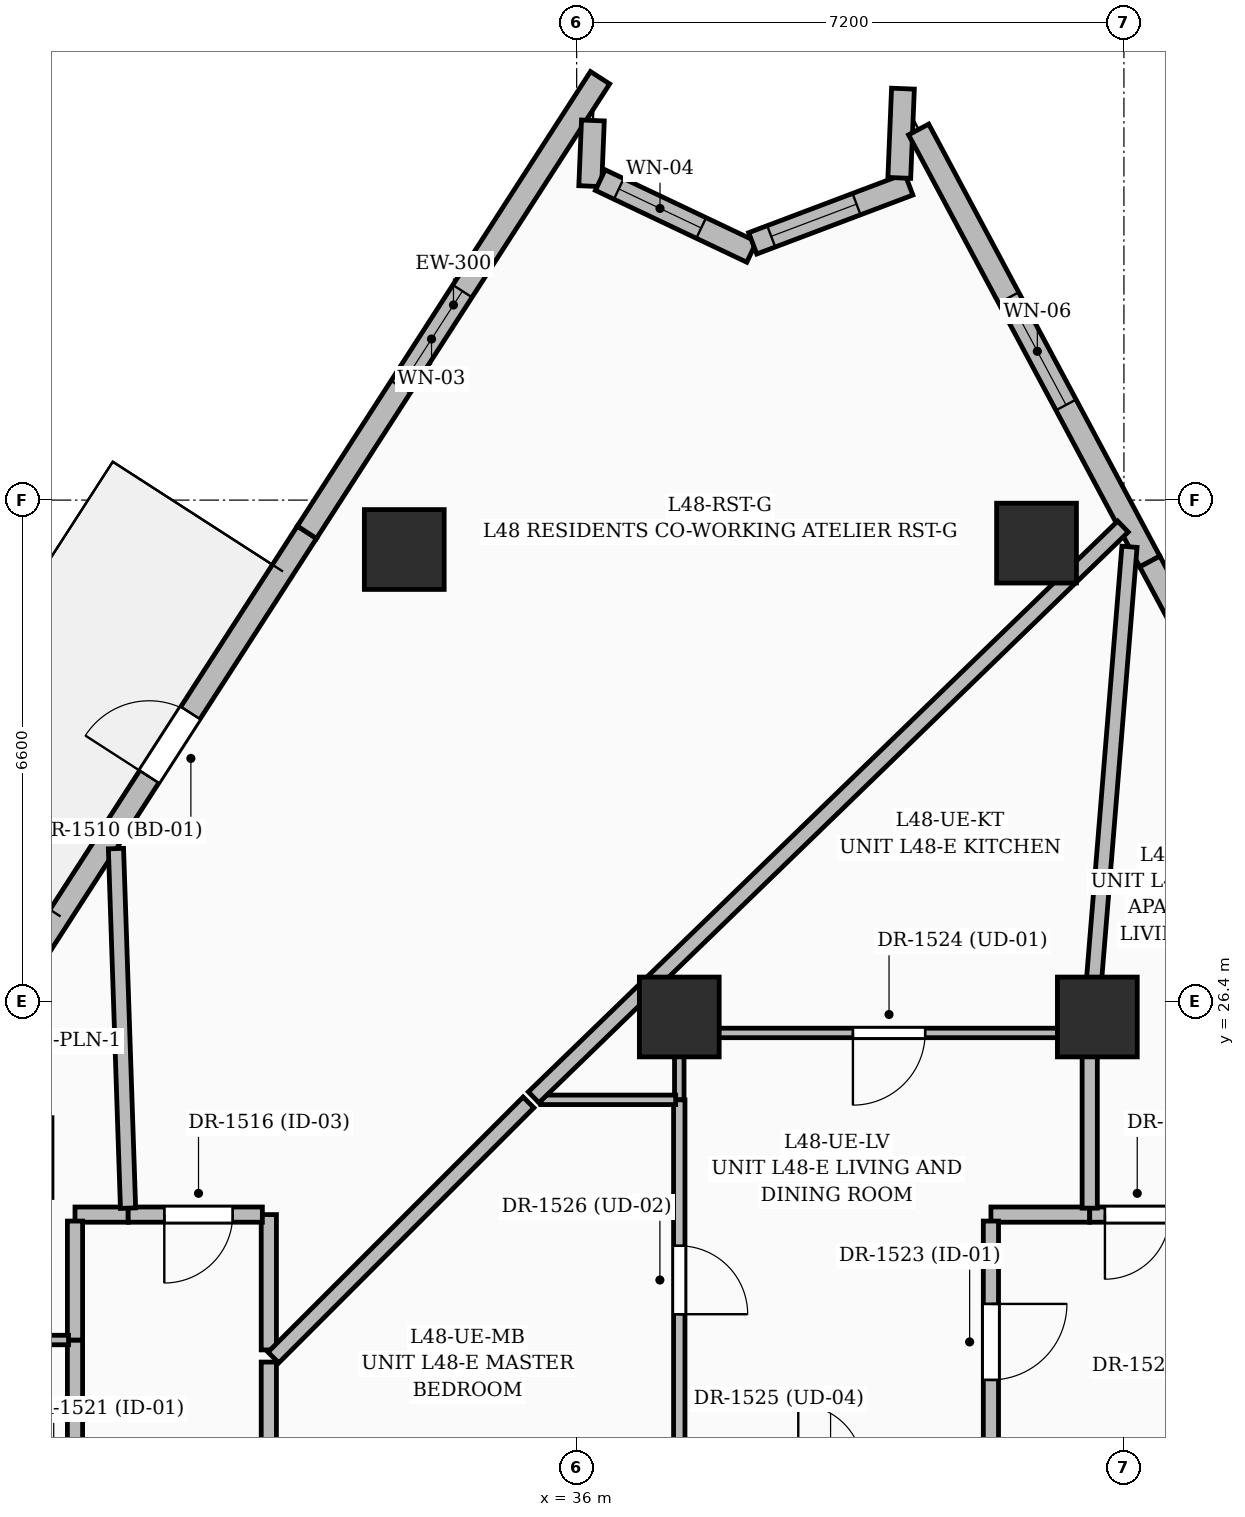
"""IFC4 building model, lengths in metres.
Left out: names, types, materials, properties, quantities, classifications, styles, units other than length and angle.
Written with IfcOpenShell. Run it as: python <this file> out.ifc"""

import sys

from ifc_helpers import new_model, si_unit, direction, frame, frame_2d, origin, origin_2d, place, context, subcontext, project, spatial, rectangle, extrude, element, fill, save


model = new_model("IFC4")
c1 = context("Model", 3, precision=1e-05, world=origin(), true_north=direction((0.0, 1.0)))
c2 = subcontext(c1, "Body", "Model", "MODEL_VIEW")
j1 = project(units=[si_unit("LENGTHUNIT", "METRE"), si_unit("PLANEANGLEUNIT", "RADIAN")], contexts=[c1])
p1 = place(None, origin())
s1 = spatial("IfcSite", under=j1, at=p1, CompositionType="ELEMENT")
p2 = place(p1, origin())
s2 = spatial("IfcBuilding", under=s1, at=p2, CompositionType="ELEMENT")
p3 = place(p2, frame((0.0, 0.0, 186.0)))
s3 = spatial("IfcBuildingStorey", under=s2, at=p3, CompositionType="ELEMENT", Elevation=186.0)
for number, where, z_axis, x_axis in (
    (1, (42.85, 26.2, 0.0), (0.0, 0.0, 1.0), (1.0, 0.0, 0.0)),
    (2, (37.35, 26.2, 0.0), (0.0, 0.0, 1.0), (1.0, 0.0, 0.0)),
    (3, (42.05, 32.434, 0.0), (0.0, 0.0, 1.0), (1.0, 0.0, 0.0)),
    (4, (33.732, 32.35, 0.0), (0.0, 0.0, 1.0), (1.0, 0.0, 0.0)),
):
    element("IfcColumn", number, at=place(p3, frame(where, z_axis=z_axis, x_axis=x_axis)), inside=s3, PredefinedType="COLUMN", context=c2, shape_type="SweptSolid", body=[
        extrude(rectangle(XDim=1.05, YDim=1.05, at=origin_2d()), origin(), (0.0, 0.0, 1.0), 3.6),
    ])
p4 = place(p3, frame((28.594, 26.597, 0.0), z_axis=(0.0, 0.0, 1.0), x_axis=(0.542031523986, 0.840358154006, 0.0)))
e5 = element("IfcWall", 5, at=p4, inside=s3, PredefinedType="SOLIDWALL", context=c2, shape_type="SweptSolid", body=[
    extrude(rectangle(XDim=7.116, YDim=0.3, at=frame_2d((3.558, 0.0))), origin(), (0.0, 0.0, 1.0), 3.35),
])
p5 = place(p4, frame((3.288, 0.0, 0.0)))
e6 = element("IfcOpeningElement", 6, at=p5, cuts=e5, PredefinedType="OPENING", context=c2, shape_type="SweptSolid", body=[
    extrude(rectangle(XDim=1.0, YDim=2.2, at=frame_2d((0.5, 1.1))), frame((0.0, 0.16, 0.0), z_axis=(0.0, -1.0, 0.0), x_axis=(1.0, 0.0, 0.0)), (0.0, 0.0, 1.0), 0.32),
])
p6 = place(p3, frame((32.451, 32.577, 0.0), z_axis=(0.0, 0.0, 1.0), x_axis=(0.542031523986, 0.840358154006, 0.0)))
e7 = element("IfcWall", 7, at=p6, inside=s3, PredefinedType="SOLIDWALL", context=c2, shape_type="SweptSolid", body=[
    extrude(rectangle(XDim=7.116, YDim=0.3, at=frame_2d((3.558, 0.0))), origin(), (0.0, 0.0, 1.0), 3.35),
])
p7 = place(p6, frame((2.275, 0.0, 0.6)))
e8 = element("IfcOpeningElement", 8, at=p7, cuts=e7, PredefinedType="OPENING", context=c2, shape_type="SweptSolid", body=[
    extrude(rectangle(XDim=1.5, YDim=2.1, at=frame_2d((0.75, 1.05))), frame((0.0, 0.16, 0.0), z_axis=(0.0, -1.0, 0.0), x_axis=(1.0, 0.0, 0.0)), (0.0, 0.0, 1.0), 0.32),
])
p8 = place(p3, frame((36.214, 37.994, 0.0), z_axis=(0.0, 0.0, 1.0), x_axis=(-0.040926134278, -0.999162174791, 0.0)))
e9 = element("IfcWall", 9, at=p8, inside=s3, PredefinedType="SOLIDWALL", context=c2, shape_type="SweptSolid", body=[
    extrude(rectangle(XDim=0.865, YDim=0.3, at=frame_2d((0.433, 0.0))), origin(), (0.0, 0.0, 1.0), 3.35),
])
p9 = place(p3, frame((36.311, 37.21, 0.0), z_axis=(0.0, 0.0, 1.0), x_axis=(0.903471604204, -0.428647944585, 0.0)))
e10 = element("IfcWall", 10, at=p9, inside=s3, PredefinedType="SOLIDWALL", context=c2, shape_type="SweptSolid", body=[
    extrude(rectangle(XDim=2.205, YDim=0.3, at=frame_2d((1.103, 0.0))), origin(), (0.0, 0.0, 1.0), 3.35),
])
p10 = place(p9, frame((0.27, 0.0, 0.8)))
e11 = element("IfcOpeningElement", 11, at=p10, cuts=e10, PredefinedType="OPENING", context=c2, shape_type="SweptSolid", body=[
    extrude(rectangle(XDim=1.2, YDim=1.8, at=frame_2d((0.6, 0.9))), frame((0.0, 0.16, 0.0), z_axis=(0.0, -1.0, 0.0), x_axis=(1.0, 0.0, 0.0)), (0.0, 0.0, 1.0), 0.32),
])
p11 = place(p3, frame((38.316, 36.378, 0.0), z_axis=(0.0, 0.0, 1.0), x_axis=(0.935503953589, 0.353316222129, 0.0)))
e12 = element("IfcWall", 12, at=p11, inside=s3, PredefinedType="SOLIDWALL", context=c2, shape_type="SweptSolid", body=[
    extrude(rectangle(XDim=2.195, YDim=0.3, at=frame_2d((1.098, 0.0))), origin(), (0.0, 0.0, 1.0), 3.35),
])
p12 = place(p11, frame((0.26, 0.0, 0.8)))
e13 = element("IfcOpeningElement", 13, at=p12, cuts=e12, PredefinedType="OPENING", context=c2, shape_type="SweptSolid", body=[
    extrude(rectangle(XDim=1.2, YDim=1.8, at=frame_2d((0.6, 0.9))), frame((0.0, 0.16, 0.0), z_axis=(0.0, -1.0, 0.0), x_axis=(1.0, 0.0, 0.0)), (0.0, 0.0, 1.0), 0.32),
])
p13 = place(p3, frame((40.245, 37.239, 0.0), z_axis=(0.0, 0.0, 1.0), x_axis=(0.040939027533, 0.999161646594, 0.0)))
e14 = element("IfcWall", 14, at=p13, inside=s3, PredefinedType="SOLIDWALL", context=c2, shape_type="SweptSolid", body=[
    extrude(rectangle(XDim=1.175, YDim=0.3, at=frame_2d((0.587, 0.0))), origin(), (0.0, 0.0, 1.0), 3.35),
])
p14 = place(p3, frame((40.499, 37.876, 0.0), z_axis=(0.0, 0.0, 1.0), x_axis=(0.471749487015, -0.881732624723, 0.0)))
e15 = element("IfcWall", 15, at=p14, inside=s3, PredefinedType="SOLIDWALL", context=c2, shape_type="SweptSolid", body=[
    extrude(rectangle(XDim=6.447, YDim=0.3, at=frame_2d((3.223, 0.0))), origin(), (0.0, 0.0, 1.0), 3.35),
])
p15 = place(p14, frame((2.51, 0.0, 0.55)))
e16 = element("IfcOpeningElement", 16, at=p15, cuts=e15, PredefinedType="OPENING", context=c2, shape_type="SweptSolid", body=[
    extrude(rectangle(XDim=1.6, YDim=2.2, at=frame_2d((0.8, 1.1))), frame((0.0, 0.16, 0.0), z_axis=(0.0, -1.0, 0.0), x_axis=(1.0, 0.0, 0.0)), (0.0, 0.0, 1.0), 0.32),
])
p16 = place(p3, frame((43.541, 32.192, 0.0), z_axis=(0.0, 0.0, 1.0), x_axis=(0.471760157183, -0.881726915827, 0.0)))
e17 = element("IfcWall", 17, at=p16, inside=s3, PredefinedType="SOLIDWALL", context=c2, shape_type="SweptSolid", body=[
    extrude(rectangle(XDim=7.037, YDim=0.3, at=frame_2d((3.518, 0.0))), origin(), (0.0, 0.0, 1.0), 3.35),
])
p17 = place(p16, frame((2.65, 0.0, 0.6)))
e18 = element("IfcOpeningElement", 18, at=p17, cuts=e17, PredefinedType="OPENING", context=c2, shape_type="SweptSolid", body=[
    extrude(rectangle(XDim=1.5, YDim=2.1, at=frame_2d((0.75, 1.05))), frame((0.0, 0.16, 0.0), z_axis=(0.0, -1.0, 0.0), x_axis=(1.0, 0.0, 0.0)), (0.0, 0.0, 1.0), 0.32),
])
p18 = place(p3, frame((29.4, 21.95, 0.0), z_axis=(0.0, 0.0, 1.0), x_axis=(0.0, -1.0, 0.0)))
e19 = element("IfcWall", 19, at=p18, inside=s3, PredefinedType="PARTITIONING", context=c2, shape_type="SweptSolid", body=[
    extrude(rectangle(XDim=4.2, YDim=0.2, at=frame_2d((2.1, 0.0))), origin(), (0.0, 0.0, 1.0), 2.709),
])
p19 = place(p18, frame((1.542, 0.0, 0.0)))
e20 = element("IfcOpeningElement", 20, at=p19, cuts=e19, PredefinedType="OPENING", context=c2, shape_type="SweptSolid", body=[
    extrude(rectangle(XDim=1.0, YDim=2.2, at=frame_2d((0.5, 1.1))), frame((0.0, 0.11, 0.0), z_axis=(0.0, -1.0, 0.0), x_axis=(1.0, 0.0, 0.0)), (0.0, 0.0, 1.0), 0.22),
])
p20 = place(p3, frame((30.1, 23.6, 0.0), z_axis=(0.0, 0.0, 1.0), x_axis=(-1.0, 0.0, 0.0)))
e21 = element("IfcWall", 21, at=p20, inside=s3, PredefinedType="PARTITIONING", context=c2, shape_type="SweptSolid", body=[
    extrude(rectangle(XDim=0.7, YDim=0.2, at=frame_2d((0.35, 0.0))), origin(), (0.0, 0.0, 1.0), 2.464),
])
p21 = place(p3, frame((29.4, 23.515, 0.0), z_axis=(0.0, 0.0, 1.0), x_axis=(0.0, -1.0, 0.0)))
e22 = element("IfcWall", 22, at=p21, inside=s3, PredefinedType="PARTITIONING", context=c2, shape_type="SweptSolid", body=[
    extrude(rectangle(XDim=1.565, YDim=0.2, at=frame_2d((0.782, 0.0))), origin(), (0.0, 0.0, 1.0), 2.464),
])
p22 = place(p3, frame((42.75, 23.6, 0.0), z_axis=(0.0, 0.0, 1.0), x_axis=(-1.0, 0.0, 0.0)))
e23 = element("IfcWall", 23, at=p22, inside=s3, PredefinedType="PARTITIONING", context=c2, shape_type="SweptSolid", body=[
    extrude(rectangle(XDim=1.3, YDim=0.2, at=frame_2d((0.65, 0.0))), origin(), (0.0, 0.0, 1.0), 3.35),
])
p23 = place(p3, frame((41.45, 23.515, 0.0), z_axis=(0.0, 0.0, 1.0), x_axis=(0.0, -1.0, 0.0)))
e24 = element("IfcWall", 24, at=p23, inside=s3, PredefinedType="PARTITIONING", context=c2, shape_type="SweptSolid", body=[
    extrude(rectangle(XDim=3.265, YDim=0.2, at=frame_2d((1.632, 0.0))), origin(), (0.0, 0.0, 1.0), 3.35),
])
p24 = place(p23, frame((1.09, 0.0, 0.0)))
e25 = element("IfcOpeningElement", 25, at=p24, cuts=e24, PredefinedType="OPENING", context=c2, shape_type="SweptSolid", body=[
    extrude(rectangle(XDim=1.0, YDim=2.2, at=frame_2d((0.5, 1.1))), frame((0.0, 0.11, 0.0), z_axis=(0.0, -1.0, 0.0), x_axis=(1.0, 0.0, 0.0)), (0.0, 0.0, 1.0), 0.22),
])
p25 = place(p3, frame((31.95, 19.42, 0.0), z_axis=(0.0, 0.0, 1.0), x_axis=(0.0, 1.0, 0.0)))
e26 = element("IfcWall", 26, at=p25, inside=s3, PredefinedType="PARTITIONING", context=c2, shape_type="SweptSolid", body=[
    extrude(rectangle(XDim=2.24, YDim=0.2, at=frame_2d((1.12, 0.0))), origin(), (0.0, 0.0, 1.0), 2.464),
])
p26 = place(p3, frame((43.915, 23.6, 0.0), z_axis=(0.0, 0.0, 1.0), x_axis=(-1.0, 0.0, 0.0)))
e27 = element("IfcWall", 27, at=p26, inside=s3, PredefinedType="PARTITIONING", context=c2, shape_type="SweptSolid", body=[
    extrude(rectangle(XDim=1.165, YDim=0.2, at=frame_2d((0.583, 0.0))), origin(), (0.0, 0.0, 1.0), 2.436),
])
p27 = place(p26, frame((0.115, 0.0, 0.0)))
e28 = element("IfcOpeningElement", 28, at=p27, cuts=e27, PredefinedType="OPENING", context=c2, shape_type="SweptSolid", body=[
    extrude(rectangle(XDim=0.85, YDim=2.1, at=frame_2d((0.425, 1.05))), frame((0.0, 0.11, 0.0), z_axis=(0.0, -1.0, 0.0), x_axis=(1.0, 0.0, 0.0)), (0.0, 0.0, 1.0), 0.22),
])
p28 = place(p3, frame((31.95, 21.82, 0.0), z_axis=(0.0, 0.0, 1.0), x_axis=(0.0, 1.0, 0.0)))
e29 = element("IfcWall", 29, at=p28, inside=s3, PredefinedType="PARTITIONING", context=c2, shape_type="SweptSolid", body=[
    extrude(rectangle(XDim=1.78, YDim=0.2, at=frame_2d((0.89, 0.0))), origin(), (0.0, 0.0, 1.0), 2.709),
])
p29 = place(p3, frame((31.865, 23.6, 0.0), z_axis=(0.0, 0.0, 1.0), x_axis=(-1.0, 0.0, 0.0)))
e30 = element("IfcWall", 30, at=p29, inside=s3, PredefinedType="PARTITIONING", context=c2, shape_type="SweptSolid", body=[
    extrude(rectangle(XDim=1.765, YDim=0.2, at=frame_2d((0.882, 0.0))), origin(), (0.0, 0.0, 1.0), 2.709),
])
p30 = place(p29, frame((0.39, 0.0, 0.0)))
e31 = element("IfcOpeningElement", 31, at=p30, cuts=e30, PredefinedType="OPENING", context=c2, shape_type="SweptSolid", body=[
    extrude(rectangle(XDim=0.9, YDim=2.1, at=frame_2d((0.45, 1.05))), frame((0.0, 0.11, 0.0), z_axis=(0.0, -1.0, 0.0), x_axis=(1.0, 0.0, 0.0)), (0.0, 0.0, 1.0), 0.22),
])
p31 = place(p3, frame((29.315, 21.95, 0.0), z_axis=(0.0, 0.0, 1.0), x_axis=(-1.0, 0.0, 0.0)))
e32 = element("IfcWall", 32, at=p31, inside=s3, PredefinedType="PARTITIONING", context=c2, shape_type="SweptSolid", body=[
    extrude(rectangle(XDim=1.315, YDim=0.125, at=frame_2d((0.657, 0.0))), origin(), (0.0, 0.0, 1.0), 3.35),
])
p32 = place(p3, frame((30.098, 23.685, 0.0), z_axis=(0.0, 0.0, 1.0), x_axis=(-0.033582780866, 0.999435939332, 0.0)))
e33 = element("IfcWall", 33, at=p32, inside=s3, PredefinedType="PARTITIONING", context=c2, shape_type="SweptSolid", body=[
    extrude(rectangle(XDim=4.733, YDim=0.2, at=frame_2d((2.366, 0.0))), origin(), (0.0, 0.0, 1.0), 2.57),
])
p33 = place(p3, frame((42.75, 25.99, 0.0), z_axis=(0.0, 0.0, 1.0), x_axis=(-1.0, 0.0, 0.0)))
e34 = element("IfcWall", 34, at=p33, inside=s3, PredefinedType="PARTITIONING", context=c2, shape_type="SweptSolid", body=[
    extrude(rectangle(XDim=5.4, YDim=0.125, at=frame_2d((2.7, 0.0))), origin(), (0.0, 0.0, 1.0), 2.436),
])
p34 = place(p33, frame((2.165, 0.0, 0.0)))
e35 = element("IfcOpeningElement", 35, at=p34, cuts=e34, PredefinedType="OPENING", context=c2, shape_type="SweptSolid", body=[
    extrude(rectangle(XDim=0.95, YDim=2.2, at=frame_2d((0.475, 1.1))), frame((0.0, 0.072, 0.0), z_axis=(0.0, -1.0, 0.0), x_axis=(1.0, 0.0, 0.0)), (0.0, 0.0, 1.0), 0.145),
])
p35 = place(p3, frame((37.35, 25.942, 0.0), z_axis=(0.0, 0.0, 1.0), x_axis=(0.0, -1.0, 0.0)))
e36 = element("IfcWall", 36, at=p35, inside=s3, PredefinedType="PARTITIONING", context=c2, shape_type="SweptSolid", body=[
    extrude(rectangle(XDim=0.832, YDim=0.125, at=frame_2d((0.416, 0.0))), origin(), (0.0, 0.0, 1.0), 3.35),
])
p36 = place(p3, frame((37.35, 25.11, 0.0), z_axis=(0.0, 0.0, 1.0), x_axis=(0.0, -1.0, 0.0)))
e37 = element("IfcWall", 37, at=p36, inside=s3, PredefinedType="PARTITIONING", context=c2, shape_type="SweptSolid", body=[
    extrude(rectangle(XDim=4.8, YDim=0.15, at=frame_2d((2.4, 0.0))), origin(), (0.0, 0.0, 1.0), 3.35),
])
p37 = place(p36, frame((1.921, 0.0, 0.0)))
e38 = element("IfcOpeningElement", 38, at=p37, cuts=e37, PredefinedType="OPENING", context=c2, shape_type="SweptSolid", body=[
    extrude(rectangle(XDim=0.9, YDim=2.15, at=frame_2d((0.45, 1.075))), frame((0.0, 0.085, 0.0), z_axis=(0.0, -1.0, 0.0), x_axis=(1.0, 0.0, 0.0)), (0.0, 0.0, 1.0), 0.17),
])
p38 = place(p3, frame((42.75, 23.685, 0.0), z_axis=(0.0, 0.0, 1.0), x_axis=(0.0, 1.0, 0.0)))
e39 = element("IfcWall", 39, at=p38, inside=s3, PredefinedType="PARTITIONING", context=c2, shape_type="SweptSolid", body=[
    extrude(rectangle(XDim=2.257, YDim=0.2, at=frame_2d((1.129, 0.0))), origin(), (0.0, 0.0, 1.0), 3.35),
])
p39 = place(p3, frame((35.53, 25.11, 0.0), z_axis=(0.0, 0.0, 1.0), x_axis=(1.0, 0.0, 0.0)))
e40 = element("IfcWall", 40, at=p39, inside=s3, PredefinedType="PARTITIONING", context=c2, shape_type="SweptSolid", body=[
    extrude(rectangle(XDim=1.772, YDim=0.125, at=frame_2d((0.886, 0.0))), origin(), (0.0, 0.0, 1.0), 2.436),
])
p40 = place(p3, frame((42.753, 26.037, 0.0), z_axis=(0.0, 0.0, 1.0), x_axis=(0.081560923922, 0.996668357925, 0.0)))
e41 = element("IfcWall", 41, at=p40, inside=s3, PredefinedType="PARTITIONING", context=c2, shape_type="SweptSolid", body=[
    extrude(rectangle(XDim=6.37, YDim=0.2, at=frame_2d((3.185, 0.0))), origin(), (0.0, 0.0, 1.0), 2.464),
])
p41 = place(p3, frame((43.187, 32.652, 0.0), z_axis=(0.0, 0.0, 1.0), x_axis=(-0.718315109046, -0.695717905559, 0.0)))
e42 = element("IfcWall", 42, at=p41, inside=s3, PredefinedType="PARTITIONING", context=c2, shape_type="SweptSolid", body=[
    extrude(rectangle(XDim=10.793, YDim=0.2, at=frame_2d((5.396, 0.0))), origin(), (0.0, 0.0, 1.0), 2.464),
])
p42 = place(p3, frame((35.366, 25.076, 0.0), z_axis=(0.0, 0.0, 1.0), x_axis=(-0.707132498369, -0.707081063069, 0.0)))
e43 = element("IfcWall", 43, at=p42, inside=s3, PredefinedType="PARTITIONING", context=c2, shape_type="SweptSolid", body=[
    extrude(rectangle(XDim=4.747, YDim=0.2, at=frame_2d((2.373, 0.0))), origin(), (0.0, 0.0, 1.0), 2.709),
])
p43 = place(p5, origin())
e44 = element("IfcDoor", 44, at=p43, inside=s3, OperationType="SINGLE_SWING_LEFT", PredefinedType="DOOR", context=c2, shape_type="SweptSolid", body=[
    extrude(rectangle(XDim=1.0, YDim=2.2, at=frame_2d((0.5, 1.1))), frame((0.0, 0.025, 0.0), z_axis=(0.0, -1.0, 0.0), x_axis=(1.0, 0.0, 0.0)), (0.0, 0.0, 1.0), 0.05),
])
fill(e6, e44)
p44 = place(p7, origin())
e45 = element("IfcWindow", 45, at=p44, inside=s3, PartitioningType="SINGLE_PANEL", PredefinedType="WINDOW", context=c2, shape_type="SweptSolid", body=[
    extrude(rectangle(XDim=1.5, YDim=2.1, at=frame_2d((0.75, 1.05))), frame((0.0, 0.03, 0.0), z_axis=(0.0, -1.0, 0.0), x_axis=(1.0, 0.0, 0.0)), (0.0, 0.0, 1.0), 0.06),
])
fill(e8, e45)
p45 = place(p10, origin())
e46 = element("IfcWindow", 46, at=p45, inside=s3, PartitioningType="SINGLE_PANEL", PredefinedType="WINDOW", context=c2, shape_type="SweptSolid", body=[
    extrude(rectangle(XDim=1.2, YDim=1.8, at=frame_2d((0.6, 0.9))), frame((0.0, 0.03, 0.0), z_axis=(0.0, -1.0, 0.0), x_axis=(1.0, 0.0, 0.0)), (0.0, 0.0, 1.0), 0.06),
])
fill(e11, e46)
p46 = place(p12, origin())
e47 = element("IfcWindow", 47, at=p46, inside=s3, PartitioningType="SINGLE_PANEL", PredefinedType="WINDOW", context=c2, shape_type="SweptSolid", body=[
    extrude(rectangle(XDim=1.2, YDim=1.8, at=frame_2d((0.6, 0.9))), frame((0.0, 0.03, 0.0), z_axis=(0.0, -1.0, 0.0), x_axis=(1.0, 0.0, 0.0)), (0.0, 0.0, 1.0), 0.06),
])
fill(e13, e47)
p47 = place(p15, origin())
e48 = element("IfcWindow", 48, at=p47, inside=s3, PartitioningType="SINGLE_PANEL", PredefinedType="WINDOW", context=c2, shape_type="SweptSolid", body=[
    extrude(rectangle(XDim=1.6, YDim=2.2, at=frame_2d((0.8, 1.1))), frame((0.0, 0.03, 0.0), z_axis=(0.0, -1.0, 0.0), x_axis=(1.0, 0.0, 0.0)), (0.0, 0.0, 1.0), 0.06),
])
fill(e16, e48)
p48 = place(p30, origin())
e49 = element("IfcDoor", 49, at=p48, inside=s3, OperationType="SINGLE_SWING_RIGHT", PredefinedType="DOOR", context=c2, shape_type="SweptSolid", body=[
    extrude(rectangle(XDim=0.9, YDim=2.1, at=frame_2d((0.45, 1.05))), frame((0.0, 0.025, 0.0), z_axis=(0.0, -1.0, 0.0), x_axis=(1.0, 0.0, 0.0)), (0.0, 0.0, 1.0), 0.05),
])
fill(e31, e49)
p49 = place(p24, origin())
e50 = element("IfcDoor", 50, at=p49, inside=s3, OperationType="SINGLE_SWING_LEFT", PredefinedType="DOOR", context=c2, shape_type="SweptSolid", body=[
    extrude(rectangle(XDim=1.0, YDim=2.2, at=frame_2d((0.5, 1.1))), frame((0.0, 0.025, 0.0), z_axis=(0.0, -1.0, 0.0), x_axis=(1.0, 0.0, 0.0)), (0.0, 0.0, 1.0), 0.05),
])
fill(e25, e50)
p50 = place(p34, origin())
e51 = element("IfcDoor", 51, at=p50, inside=s3, OperationType="SINGLE_SWING_RIGHT", PredefinedType="DOOR", context=c2, shape_type="SweptSolid", body=[
    extrude(rectangle(XDim=0.95, YDim=2.2, at=frame_2d((0.475, 1.1))), frame((0.0, 0.025, 0.0), z_axis=(0.0, -1.0, 0.0), x_axis=(1.0, 0.0, 0.0)), (0.0, 0.0, 1.0), 0.05),
])
fill(e35, e51)
p51 = place(p37, origin())
e52 = element("IfcDoor", 52, at=p51, inside=s3, OperationType="SINGLE_SWING_RIGHT", PredefinedType="DOOR", context=c2, shape_type="SweptSolid", body=[
    extrude(rectangle(XDim=0.9, YDim=2.15, at=frame_2d((0.45, 1.075))), frame((0.0, 0.025, 0.0), z_axis=(0.0, -1.0, 0.0), x_axis=(1.0, 0.0, 0.0)), (0.0, 0.0, 1.0), 0.05),
])
fill(e38, e52)
p52 = place(p27, origin())
e53 = element("IfcDoor", 53, at=p52, inside=s3, OperationType="SINGLE_SWING_RIGHT", PredefinedType="DOOR", context=c2, shape_type="SweptSolid", body=[
    extrude(rectangle(XDim=0.85, YDim=2.1, at=frame_2d((0.425, 1.05))), frame((0.0, 0.025, 0.0), z_axis=(0.0, -1.0, 0.0), x_axis=(1.0, 0.0, 0.0)), (0.0, 0.0, 1.0), 0.05),
])
fill(e28, e53)
save(model, sys.argv[1])
